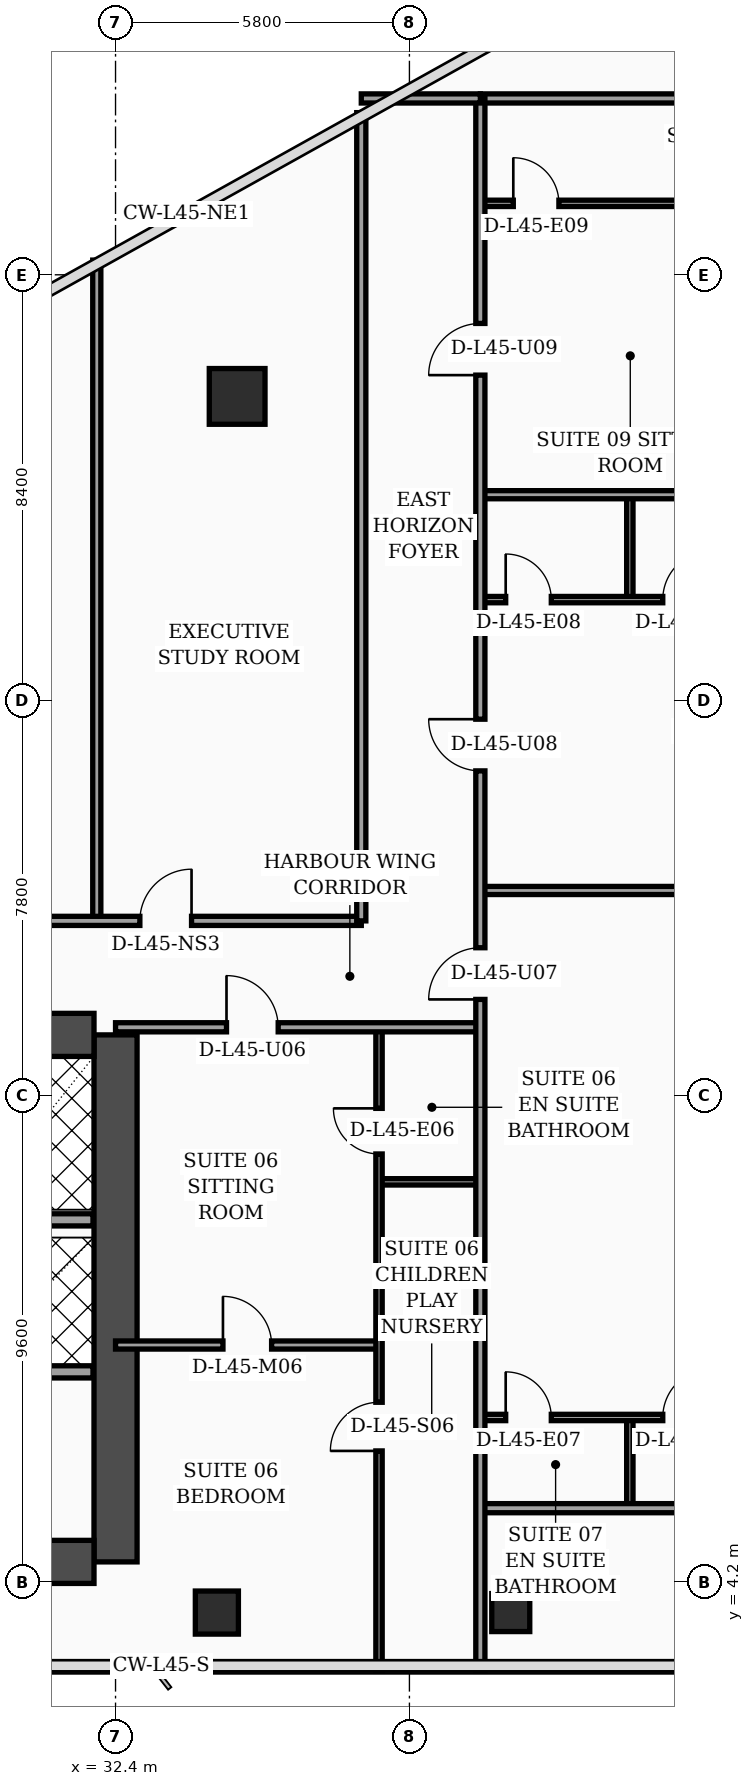
"""IFC4 building model, lengths in metres.
Left out: names, types, materials, properties, quantities, classifications, styles, units other than length and angle.
Written with IfcOpenShell. Run it as: python <this file> out.ifc"""

import sys

from ifc_helpers import new_model, si_unit, direction, frame, frame_2d, origin, origin_2d, place, context, subcontext, project, spatial, rectangle, hollow_rectangle, circle, extrude, element, fill, save


model = new_model("IFC4")
c1 = context("Model", 3, precision=1e-05, world=origin(), true_north=direction((0.0, 1.0)))
c2 = subcontext(c1, "Body", "Model", "MODEL_VIEW")
j1 = project(units=[si_unit("LENGTHUNIT", "METRE"), si_unit("PLANEANGLEUNIT", "RADIAN")], contexts=[c1])
p1 = place(None, origin())
s1 = spatial("IfcSite", under=j1, at=p1, CompositionType="ELEMENT")
p2 = place(p1, origin())
s2 = spatial("IfcBuilding", under=s1, at=p2, CompositionType="ELEMENT")
p3 = place(p2, frame((0.0, 0.0, 182.7)))
s3 = spatial("IfcBuildingStorey", under=s2, at=p3, CompositionType="ELEMENT", Elevation=182.7)
p4 = place(p3, frame((32.4, 4.6, 0.0), z_axis=(0.0, 0.0, 1.0), x_axis=(0.0, 1.0, 0.0)))
e1 = element("IfcWall", 1, at=p4, inside=s3, PredefinedType="SHEAR", context=c2, shape_type="SweptSolid", body=[
    extrude(rectangle(XDim=10.4, YDim=0.85, at=frame_2d((5.2, 0.0))), origin(), (0.0, 0.0, 1.0), 3.52),
])
p5 = place(p3, frame((22.025, 15.0, 0.0), z_axis=(0.0, 0.0, 1.0), x_axis=(1.0, 0.0, 0.0)))
e2 = element("IfcWall", 2, at=p5, inside=s3, PredefinedType="SHEAR", context=c2, shape_type="SweptSolid", body=[
    extrude(rectangle(XDim=9.95, YDim=0.85, at=frame_2d((4.975, 0.0))), origin(), (0.0, 0.0, 1.0), 3.52),
])
p6 = place(p5, frame((4.88, 0.0, 0.0)))
e3 = element("IfcOpeningElement", 3, at=p6, cuts=e2, PredefinedType="OPENING", context=c2, shape_type="SweptSolid", body=[
    extrude(rectangle(XDim=1.1, YDim=2.2, at=frame_2d((0.55, 1.1))), frame((0.0, 0.435, 0.0), z_axis=(0.0, -1.0, 0.0), x_axis=(1.0, 0.0, 0.0)), (0.0, 0.0, 1.0), 0.87),
])
p7 = place(p3, frame((22.025, 4.6, 0.0), z_axis=(0.0, 0.0, 1.0), x_axis=(1.0, 0.0, 0.0)))
e4 = element("IfcWall", 4, at=p7, inside=s3, PredefinedType="SHEAR", context=c2, shape_type="SweptSolid", body=[
    extrude(rectangle(XDim=9.95, YDim=0.85, at=frame_2d((4.975, 0.0))), origin(), (0.0, 0.0, 1.0), 3.52),
])
p8 = place(p3, frame((34.4, 3.6, 0.0), z_axis=(0.0, 0.0, 1.0), x_axis=(1.0, 0.0, 0.0)))
e5 = element("IfcColumn", 5, at=p8, inside=s3, PredefinedType="COLUMN", context=c2, shape_type="SweptSolid", body=[
    extrude(hollow_rectangle(XDim=0.85, YDim=0.85, WallThickness=0.036, at=origin_2d()), origin(), (0.0, 0.0, 1.0), 3.52),
])
p9 = place(p3, frame((40.2, 3.6, 0.0), z_axis=(0.0, 0.0, 1.0), x_axis=(1.0, 0.0, 0.0)))
e6 = element("IfcColumn", 6, at=p9, inside=s3, PredefinedType="COLUMN", context=c2, shape_type="SweptSolid", body=[
    extrude(hollow_rectangle(XDim=0.75, YDim=0.75, WallThickness=0.032, at=origin_2d()), origin(), (0.0, 0.0, 1.0), 3.52),
])
p10 = place(p3, frame((34.8, 27.6, 0.0), z_axis=(0.0, 0.0, 1.0), x_axis=(1.0, 0.0, 0.0)))
e7 = element("IfcColumn", 7, at=p10, inside=s3, PredefinedType="COLUMN", context=c2, shape_type="SweptSolid", body=[
    extrude(circle(Radius=0.55, at=origin_2d()), origin(), (0.0, 0.0, 1.0), 3.52),
])
p11 = place(p3, frame((27.02, 11.35, 0.0), z_axis=(0.0, 0.0, 1.0), x_axis=(1.0, 0.0, 0.0)))
e8 = element("IfcWall", 8, at=p11, inside=s3, PredefinedType="SOLIDWALL", context=c2, shape_type="SweptSolid", body=[
    extrude(rectangle(XDim=4.935, YDim=0.24, at=frame_2d((2.468, 0.0))), origin(), (0.0, 0.0, 1.0), 3.52),
])
p12 = place(p11, frame((0.45, 0.0, 0.0)))
e9 = element("IfcOpeningElement", 9, at=p12, cuts=e8, PredefinedType="OPENING", context=c2, shape_type="SweptSolid", body=[
    extrude(rectangle(XDim=1.3, YDim=2.35, at=frame_2d((0.65, 1.175))), frame((0.0, 0.13, 0.0), z_axis=(0.0, -1.0, 0.0), x_axis=(1.0, 0.0, 0.0)), (0.0, 0.0, 1.0), 0.26),
])
p13 = place(p3, frame((27.02, 8.35, 0.0), z_axis=(0.0, 0.0, 1.0), x_axis=(1.0, 0.0, 0.0)))
e10 = element("IfcWall", 10, at=p13, inside=s3, PredefinedType="SOLIDWALL", context=c2, shape_type="SweptSolid", body=[
    extrude(rectangle(XDim=4.935, YDim=0.24, at=frame_2d((2.468, 0.0))), origin(), (0.0, 0.0, 1.0), 3.52),
])
p14 = place(p3, frame((37.6, 12.1, 0.0), z_axis=(0.0, 0.0, 1.0), x_axis=(1.0, 0.0, 0.0)))
e11 = element("IfcWall", 11, at=p14, inside=s3, PredefinedType="PARTITIONING", context=c2, shape_type="SweptSolid", body=[
    extrude(rectangle(XDim=2.0, YDim=0.125, at=frame_2d((1.0, 0.0))), origin(), (0.0, 0.0, 1.0), 3.52),
])
p15 = place(p3, frame((32.4, 8.88, 0.0), z_axis=(0.0, 0.0, 1.0), x_axis=(1.0, 0.0, 0.0)))
e12 = element("IfcWall", 12, at=p15, inside=s3, PredefinedType="PARTITIONING", context=c2, shape_type="SweptSolid", body=[
    extrude(rectangle(XDim=5.2, YDim=0.16, at=frame_2d((2.6, 0.0))), origin(), (0.0, 0.0, 1.0), 2.92),
])
p16 = place(p15, frame((2.12, 0.0, 0.0)))
e13 = element("IfcOpeningElement", 13, at=p16, cuts=e12, PredefinedType="OPENING", context=c2, shape_type="SweptSolid", body=[
    extrude(rectangle(XDim=0.96, YDim=2.2, at=frame_2d((0.48, 1.1))), frame((0.0, 0.09, 0.0), z_axis=(0.0, -1.0, 0.0), x_axis=(1.0, 0.0, 0.0)), (0.0, 0.0, 1.0), 0.18),
])
p17 = place(p3, frame((37.6, 2.44, 0.0), z_axis=(0.0, 0.0, 1.0), x_axis=(0.0, 1.0, 0.0)))
e14 = element("IfcWall", 14, at=p17, inside=s3, PredefinedType="PARTITIONING", context=c2, shape_type="SweptSolid", body=[
    extrude(rectangle(XDim=12.71, YDim=0.125, at=frame_2d((6.355, 0.0))), origin(), (0.0, 0.0, 1.0), 2.92),
])
p18 = place(p17, frame((4.35, 0.0, 0.0)))
e15 = element("IfcOpeningElement", 15, at=p18, cuts=e14, PredefinedType="OPENING", context=c2, shape_type="SweptSolid", body=[
    extrude(rectangle(XDim=0.96, YDim=2.2, at=frame_2d((0.48, 1.1))), frame((0.0, 0.073, 0.0), z_axis=(0.0, -1.0, 0.0), x_axis=(1.0, 0.0, 0.0)), (0.0, 0.0, 1.0), 0.145),
])
p19 = place(p17, frame((10.21, 0.0, 0.0)))
e16 = element("IfcOpeningElement", 16, at=p19, cuts=e14, PredefinedType="OPENING", context=c2, shape_type="SweptSolid", body=[
    extrude(rectangle(XDim=0.9, YDim=2.15, at=frame_2d((0.45, 1.075))), frame((0.0, 0.073, 0.0), z_axis=(0.0, -1.0, 0.0), x_axis=(1.0, 0.0, 0.0)), (0.0, 0.0, 1.0), 0.145),
])
p20 = place(p3, frame((32.4, 15.15, 0.0), z_axis=(0.0, 0.0, 1.0), x_axis=(1.0, 0.0, 0.0)))
e17 = element("IfcWall", 17, at=p20, inside=s3, PredefinedType="PARTITIONING", context=c2, shape_type="SweptSolid", body=[
    extrude(rectangle(XDim=7.2, YDim=0.18, at=frame_2d((3.6, 0.0))), origin(), (0.0, 0.0, 1.0), 2.92),
])
p21 = place(p20, frame((2.19, 0.0, 0.0)))
e18 = element("IfcOpeningElement", 18, at=p21, cuts=e17, PredefinedType="OPENING", context=c2, shape_type="SweptSolid", body=[
    extrude(rectangle(XDim=1.02, YDim=2.2, at=frame_2d((0.51, 1.1))), frame((0.0, 0.1, 0.0), z_axis=(0.0, -1.0, 0.0), x_axis=(1.0, 0.0, 0.0)), (0.0, 0.0, 1.0), 0.2),
])
p22 = place(p3, frame((32.03, 17.25, 0.0), z_axis=(0.0, 0.0, 1.0), x_axis=(0.0, 1.0, 0.0)))
e19 = element("IfcWall", 19, at=p22, inside=s3, PredefinedType="PARTITIONING", context=c2, shape_type="SweptSolid", body=[
    extrude(rectangle(XDim=13.04, YDim=0.16, at=frame_2d((6.52, 0.0))), origin(), (0.0, 0.0, 1.0), 2.92),
])
p23 = place(p3, frame((21.5, 17.25, 0.0), z_axis=(0.0, 0.0, 1.0), x_axis=(1.0, 0.0, 0.0)))
e20 = element("IfcWall", 20, at=p23, inside=s3, PredefinedType="PARTITIONING", context=c2, shape_type="SweptSolid", body=[
    extrude(rectangle(XDim=15.75, YDim=0.18, at=frame_2d((7.875, 0.0))), origin(), (0.0, 0.0, 1.0), 2.92),
])
p24 = place(p23, frame((0.95, 0.0, 0.0)))
e21 = element("IfcOpeningElement", 21, at=p24, cuts=e20, PredefinedType="OPENING", context=c2, shape_type="SweptSolid", body=[
    extrude(rectangle(XDim=1.02, YDim=2.2, at=frame_2d((0.51, 1.1))), frame((0.0, 0.1, 0.0), z_axis=(0.0, -1.0, 0.0), x_axis=(1.0, 0.0, 0.0)), (0.0, 0.0, 1.0), 0.2),
])
p25 = place(p23, frame((6.17, 0.0, 0.0)))
e22 = element("IfcOpeningElement", 22, at=p25, cuts=e20, PredefinedType="OPENING", context=c2, shape_type="SweptSolid", body=[
    extrude(rectangle(XDim=1.02, YDim=2.2, at=frame_2d((0.51, 1.1))), frame((0.0, 0.1, 0.0), z_axis=(0.0, -1.0, 0.0), x_axis=(1.0, 0.0, 0.0)), (0.0, 0.0, 1.0), 0.2),
])
p26 = place(p23, frame((11.38, 0.0, 0.0)))
e23 = element("IfcOpeningElement", 23, at=p26, cuts=e20, PredefinedType="OPENING", context=c2, shape_type="SweptSolid", body=[
    extrude(rectangle(XDim=1.02, YDim=2.2, at=frame_2d((0.51, 1.1))), frame((0.0, 0.1, 0.0), z_axis=(0.0, -1.0, 0.0), x_axis=(1.0, 0.0, 0.0)), (0.0, 0.0, 1.0), 0.2),
])
p27 = place(p3, frame((37.25, 17.25, 0.0), z_axis=(0.0, 0.0, 1.0), x_axis=(0.0, 1.0, 0.0)))
e24 = element("IfcWall", 24, at=p27, inside=s3, PredefinedType="PARTITIONING", context=c2, shape_type="SweptSolid", body=[
    extrude(rectangle(XDim=15.95, YDim=0.18, at=frame_2d((7.975, 0.0))), origin(), (0.0, 0.0, 1.0), 2.92),
])
p28 = place(p3, frame((42.55, 5.66, 0.0), z_axis=(0.0, 0.0, 1.0), x_axis=(0.0, 1.0, 0.0)))
e25 = element("IfcWall", 25, at=p28, inside=s3, PredefinedType="PARTITIONING", context=c2, shape_type="SweptSolid", body=[
    extrude(rectangle(XDim=1.79, YDim=0.125, at=frame_2d((0.895, 0.0))), origin(), (0.0, 0.0, 1.0), 3.52),
])
p29 = place(p3, frame((39.6, 7.45, 0.0), z_axis=(0.0, 0.0, 1.0), x_axis=(1.0, 0.0, 0.0)))
e26 = element("IfcWall", 26, at=p29, inside=s3, PredefinedType="PARTITIONING", context=c2, shape_type="SweptSolid", body=[
    extrude(rectangle(XDim=18.96, YDim=0.125, at=frame_2d((9.48, 0.0))), origin(), (0.0, 0.0, 1.0), 2.92),
])
p30 = place(p29, frame((0.5, 0.0, 0.0)))
e27 = element("IfcOpeningElement", 27, at=p30, cuts=e26, PredefinedType="OPENING", context=c2, shape_type="SweptSolid", body=[
    extrude(rectangle(XDim=0.9, YDim=2.15, at=frame_2d((0.45, 1.075))), frame((0.0, 0.073, 0.0), z_axis=(0.0, -1.0, 0.0), x_axis=(1.0, 0.0, 0.0)), (0.0, 0.0, 1.0), 0.145),
])
p31 = place(p29, frame((3.6, 0.0, 0.0)))
e28 = element("IfcOpeningElement", 28, at=p31, cuts=e26, PredefinedType="OPENING", context=c2, shape_type="SweptSolid", body=[
    extrude(rectangle(XDim=0.96, YDim=2.2, at=frame_2d((0.48, 1.1))), frame((0.0, 0.073, 0.0), z_axis=(0.0, -1.0, 0.0), x_axis=(1.0, 0.0, 0.0)), (0.0, 0.0, 1.0), 0.145),
])
p32 = place(p3, frame((39.6, 5.66, 0.0), z_axis=(0.0, 0.0, 1.0), x_axis=(1.0, 0.0, 0.0)))
e29 = element("IfcWall", 29, at=p32, inside=s3, PredefinedType="PARTITIONING", context=c2, shape_type="SweptSolid", body=[
    extrude(rectangle(XDim=16.4, YDim=0.18, at=frame_2d((8.2, 0.0))), origin(), (0.0, 0.0, 1.0), 2.92),
])
p33 = place(p3, frame((42.55, 23.59, 0.0), z_axis=(0.0, 0.0, 1.0), x_axis=(0.0, 1.0, 0.0)))
e30 = element("IfcWall", 30, at=p33, inside=s3, PredefinedType="PARTITIONING", context=c2, shape_type="SweptSolid", body=[
    extrude(rectangle(XDim=2.07, YDim=0.125, at=frame_2d((1.035, 0.0))), origin(), (0.0, 0.0, 1.0), 3.17),
])
p34 = place(p3, frame((39.6, 23.59, 0.0), z_axis=(0.0, 0.0, 1.0), x_axis=(1.0, 0.0, 0.0)))
e31 = element("IfcWall", 31, at=p34, inside=s3, PredefinedType="PARTITIONING", context=c2, shape_type="SweptSolid", body=[
    extrude(rectangle(XDim=13.87, YDim=0.125, at=frame_2d((6.935, 0.0))), origin(), (0.0, 0.0, 1.0), 2.92),
])
p35 = place(p34, frame((0.5, 0.0, 0.0)))
e32 = element("IfcOpeningElement", 32, at=p35, cuts=e31, PredefinedType="OPENING", context=c2, shape_type="SweptSolid", body=[
    extrude(rectangle(XDim=0.9, YDim=2.15, at=frame_2d((0.45, 1.075))), frame((0.0, 0.073, 0.0), z_axis=(0.0, -1.0, 0.0), x_axis=(1.0, 0.0, 0.0)), (0.0, 0.0, 1.0), 0.145),
])
p36 = place(p34, frame((3.6, 0.0, 0.0)))
e33 = element("IfcOpeningElement", 33, at=p36, cuts=e31, PredefinedType="OPENING", context=c2, shape_type="SweptSolid", body=[
    extrude(rectangle(XDim=0.96, YDim=2.2, at=frame_2d((0.48, 1.1))), frame((0.0, 0.073, 0.0), z_axis=(0.0, -1.0, 0.0), x_axis=(1.0, 0.0, 0.0)), (0.0, 0.0, 1.0), 0.145),
])
p37 = place(p3, frame((39.6, 31.41, 0.0), z_axis=(0.0, 0.0, 1.0), x_axis=(1.0, 0.0, 0.0)))
e34 = element("IfcWall", 34, at=p37, inside=s3, PredefinedType="PARTITIONING", context=c2, shape_type="SweptSolid", body=[
    extrude(rectangle(XDim=11.41, YDim=0.125, at=frame_2d((5.705, 0.0))), origin(), (0.0, 0.0, 1.0), 2.92),
])
p38 = place(p37, frame((0.65, 0.0, 0.0)))
e35 = element("IfcOpeningElement", 35, at=p38, cuts=e34, PredefinedType="OPENING", context=c2, shape_type="SweptSolid", body=[
    extrude(rectangle(XDim=0.9, YDim=2.15, at=frame_2d((0.45, 1.075))), frame((0.0, 0.073, 0.0), z_axis=(0.0, -1.0, 0.0), x_axis=(1.0, 0.0, 0.0)), (0.0, 0.0, 1.0), 0.145),
])
p39 = place(p3, frame((39.6, 25.66, 0.0), z_axis=(0.0, 0.0, 1.0), x_axis=(1.0, 0.0, 0.0)))
e36 = element("IfcWall", 36, at=p39, inside=s3, PredefinedType="PARTITIONING", context=c2, shape_type="SweptSolid", body=[
    extrude(rectangle(XDim=13.22, YDim=0.16, at=frame_2d((6.61, 0.0))), origin(), (0.0, 0.0, 1.0), 2.92),
])
p40 = place(p3, frame((39.6, 17.85, 0.0), z_axis=(0.0, 0.0, 1.0), x_axis=(1.0, 0.0, 0.0)))
e37 = element("IfcWall", 37, at=p40, inside=s3, PredefinedType="PARTITIONING", context=c2, shape_type="SweptSolid", body=[
    extrude(rectangle(XDim=15.68, YDim=0.16, at=frame_2d((7.84, 0.0))), origin(), (0.0, 0.0, 1.0), 2.92),
])
p41 = place(p3, frame((39.6, 33.48, 0.0), z_axis=(0.0, 0.0, 1.0), x_axis=(1.0, 0.0, 0.0)))
e38 = element("IfcWall", 38, at=p41, inside=s3, PredefinedType="PARTITIONING", context=c2, shape_type="SweptSolid", body=[
    extrude(rectangle(XDim=10.76, YDim=0.18, at=frame_2d((5.38, 0.0))), origin(), (0.0, 0.0, 1.0), 2.92),
])
p42 = place(p3, frame((39.6, 2.44, 0.0), z_axis=(0.0, 0.0, 1.0), x_axis=(0.0, 1.0, 0.0)))
e39 = element("IfcWall", 39, at=p42, inside=s3, PredefinedType="PARTITIONING", context=c2, shape_type="SweptSolid", body=[
    extrude(rectangle(XDim=31.04, YDim=0.18, at=frame_2d((15.52, 0.0))), origin(), (0.0, 0.0, 1.0), 2.92),
])
p43 = place(p42, frame((13.26, 0.0, 0.0)))
e40 = element("IfcOpeningElement", 40, at=p43, cuts=e39, PredefinedType="OPENING", context=c2, shape_type="SweptSolid", body=[
    extrude(rectangle(XDim=1.02, YDim=2.2, at=frame_2d((0.51, 1.1))), frame((0.0, 0.1, 0.0), z_axis=(0.0, -1.0, 0.0), x_axis=(1.0, 0.0, 0.0)), (0.0, 0.0, 1.0), 0.2),
])
p44 = place(p42, frame((17.77, 0.0, 0.0)))
e41 = element("IfcOpeningElement", 41, at=p44, cuts=e39, PredefinedType="OPENING", context=c2, shape_type="SweptSolid", body=[
    extrude(rectangle(XDim=1.02, YDim=2.2, at=frame_2d((0.51, 1.1))), frame((0.0, 0.1, 0.0), z_axis=(0.0, -1.0, 0.0), x_axis=(1.0, 0.0, 0.0)), (0.0, 0.0, 1.0), 0.2),
])
p45 = place(p42, frame((25.58, 0.0, 0.0)))
e42 = element("IfcOpeningElement", 42, at=p45, cuts=e39, PredefinedType="OPENING", context=c2, shape_type="SweptSolid", body=[
    extrude(rectangle(XDim=1.02, YDim=2.2, at=frame_2d((0.51, 1.1))), frame((0.0, 0.1, 0.0), z_axis=(0.0, -1.0, 0.0), x_axis=(1.0, 0.0, 0.0)), (0.0, 0.0, 1.0), 0.2),
])
p46 = place(p3, frame((37.25, 33.48, 0.0), z_axis=(0.0, 0.0, 1.0), x_axis=(1.0, 0.0, 0.0)))
e43 = element("IfcWall", 43, at=p46, inside=s3, PredefinedType="PARTITIONING", context=c2, shape_type="SweptSolid", body=[
    extrude(rectangle(XDim=2.35, YDim=0.18, at=frame_2d((1.175, 0.0))), origin(), (0.0, 0.0, 1.0), 3.52),
])
p47 = place(p16, origin())
e44 = element("IfcDoor", 44, at=p47, inside=s3, OperationType="SINGLE_SWING_LEFT", PredefinedType="DOOR", context=c2, shape_type="SweptSolid", body=[
    extrude(rectangle(XDim=0.96, YDim=2.2, at=frame_2d((0.48, 1.1))), frame((0.0, 0.025, 0.0), z_axis=(0.0, -1.0, 0.0), x_axis=(1.0, 0.0, 0.0)), (0.0, 0.0, 1.0), 0.05),
])
fill(e13, e44)
p48 = place(p18, origin())
e45 = element("IfcDoor", 45, at=p48, inside=s3, OperationType="SINGLE_SWING_LEFT", PredefinedType="DOOR", context=c2, shape_type="SweptSolid", body=[
    extrude(rectangle(XDim=0.96, YDim=2.2, at=frame_2d((0.48, 1.1))), frame((0.0, 0.025, 0.0), z_axis=(0.0, -1.0, 0.0), x_axis=(1.0, 0.0, 0.0)), (0.0, 0.0, 1.0), 0.05),
])
fill(e15, e45)
p49 = place(p19, origin())
e46 = element("IfcDoor", 46, at=p49, inside=s3, OperationType="SINGLE_SWING_RIGHT", PredefinedType="DOOR", context=c2, shape_type="SweptSolid", body=[
    extrude(rectangle(XDim=0.9, YDim=2.15, at=frame_2d((0.45, 1.075))), frame((0.0, 0.025, 0.0), z_axis=(0.0, -1.0, 0.0), x_axis=(1.0, 0.0, 0.0)), (0.0, 0.0, 1.0), 0.05),
])
fill(e16, e46)
p50 = place(p21, origin())
e47 = element("IfcDoor", 47, at=p50, inside=s3, OperationType="SINGLE_SWING_LEFT", PredefinedType="DOOR", context=c2, shape_type="SweptSolid", body=[
    extrude(rectangle(XDim=1.02, YDim=2.2, at=frame_2d((0.51, 1.1))), frame((0.0, 0.025, 0.0), z_axis=(0.0, -1.0, 0.0), x_axis=(1.0, 0.0, 0.0)), (0.0, 0.0, 1.0), 0.05),
])
fill(e18, e47)
p51 = place(p26, origin())
e48 = element("IfcDoor", 48, at=p51, inside=s3, OperationType="SINGLE_SWING_RIGHT", PredefinedType="DOOR", context=c2, shape_type="SweptSolid", body=[
    extrude(rectangle(XDim=1.02, YDim=2.2, at=frame_2d((0.51, 1.1))), frame((0.0, 0.025, 0.0), z_axis=(0.0, -1.0, 0.0), x_axis=(1.0, 0.0, 0.0)), (0.0, 0.0, 1.0), 0.05),
])
fill(e23, e48)
p52 = place(p30, origin())
e49 = element("IfcDoor", 49, at=p52, inside=s3, OperationType="SINGLE_SWING_LEFT", PredefinedType="DOOR", context=c2, shape_type="SweptSolid", body=[
    extrude(rectangle(XDim=0.9, YDim=2.15, at=frame_2d((0.45, 1.075))), frame((0.0, 0.025, 0.0), z_axis=(0.0, -1.0, 0.0), x_axis=(1.0, 0.0, 0.0)), (0.0, 0.0, 1.0), 0.05),
])
fill(e27, e49)
p53 = place(p31, origin())
e50 = element("IfcDoor", 50, at=p53, inside=s3, OperationType="SINGLE_SWING_RIGHT", PredefinedType="DOOR", context=c2, shape_type="SweptSolid", body=[
    extrude(rectangle(XDim=0.96, YDim=2.2, at=frame_2d((0.48, 1.1))), frame((0.0, 0.025, 0.0), z_axis=(0.0, -1.0, 0.0), x_axis=(1.0, 0.0, 0.0)), (0.0, 0.0, 1.0), 0.05),
])
fill(e28, e50)
p54 = place(p35, origin())
e51 = element("IfcDoor", 51, at=p54, inside=s3, OperationType="SINGLE_SWING_LEFT", PredefinedType="DOOR", context=c2, shape_type="SweptSolid", body=[
    extrude(rectangle(XDim=0.9, YDim=2.15, at=frame_2d((0.45, 1.075))), frame((0.0, 0.025, 0.0), z_axis=(0.0, -1.0, 0.0), x_axis=(1.0, 0.0, 0.0)), (0.0, 0.0, 1.0), 0.05),
])
fill(e32, e51)
p55 = place(p36, origin())
e52 = element("IfcDoor", 52, at=p55, inside=s3, OperationType="SINGLE_SWING_RIGHT", PredefinedType="DOOR", context=c2, shape_type="SweptSolid", body=[
    extrude(rectangle(XDim=0.96, YDim=2.2, at=frame_2d((0.48, 1.1))), frame((0.0, 0.025, 0.0), z_axis=(0.0, -1.0, 0.0), x_axis=(1.0, 0.0, 0.0)), (0.0, 0.0, 1.0), 0.05),
])
fill(e33, e52)
p56 = place(p38, origin())
e53 = element("IfcDoor", 53, at=p56, inside=s3, OperationType="SINGLE_SWING_LEFT", PredefinedType="DOOR", context=c2, shape_type="SweptSolid", body=[
    extrude(rectangle(XDim=0.9, YDim=2.15, at=frame_2d((0.45, 1.075))), frame((0.0, 0.025, 0.0), z_axis=(0.0, -1.0, 0.0), x_axis=(1.0, 0.0, 0.0)), (0.0, 0.0, 1.0), 0.05),
])
fill(e35, e53)
p57 = place(p43, origin())
e54 = element("IfcDoor", 54, at=p57, inside=s3, OperationType="SINGLE_SWING_LEFT", PredefinedType="DOOR", context=c2, shape_type="SweptSolid", body=[
    extrude(rectangle(XDim=1.02, YDim=2.2, at=frame_2d((0.51, 1.1))), frame((0.0, 0.025, 0.0), z_axis=(0.0, -1.0, 0.0), x_axis=(1.0, 0.0, 0.0)), (0.0, 0.0, 1.0), 0.05),
])
fill(e40, e54)
p58 = place(p44, origin())
e55 = element("IfcDoor", 55, at=p58, inside=s3, OperationType="SINGLE_SWING_RIGHT", PredefinedType="DOOR", context=c2, shape_type="SweptSolid", body=[
    extrude(rectangle(XDim=1.02, YDim=2.2, at=frame_2d((0.51, 1.1))), frame((0.0, 0.025, 0.0), z_axis=(0.0, -1.0, 0.0), x_axis=(1.0, 0.0, 0.0)), (0.0, 0.0, 1.0), 0.05),
])
fill(e41, e55)
p59 = place(p45, origin())
e56 = element("IfcDoor", 56, at=p59, inside=s3, OperationType="SINGLE_SWING_LEFT", PredefinedType="DOOR", context=c2, shape_type="SweptSolid", body=[
    extrude(rectangle(XDim=1.02, YDim=2.2, at=frame_2d((0.51, 1.1))), frame((0.0, 0.025, 0.0), z_axis=(0.0, -1.0, 0.0), x_axis=(1.0, 0.0, 0.0)), (0.0, 0.0, 1.0), 0.05),
])
fill(e42, e56)
save(model, sys.argv[1])
